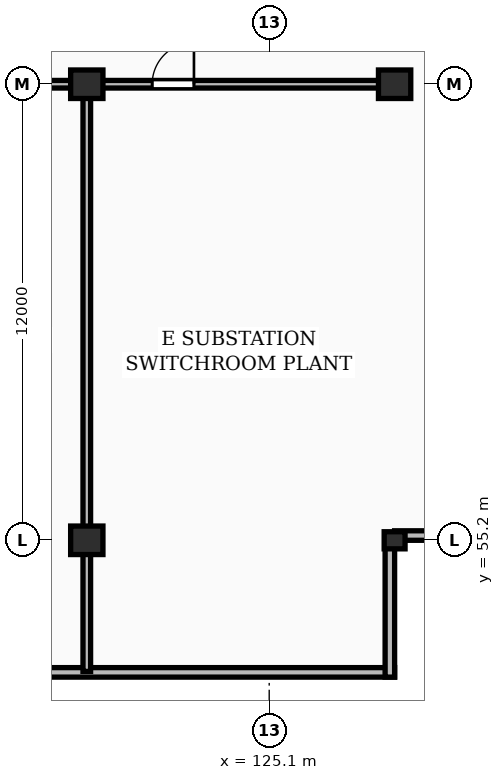
"""IFC4 building model, lengths in metres.
Left out: names, types, materials, properties, quantities, classifications, styles, units other than length and angle.
Written with IfcOpenShell. Run it as: python <this file> out.ifc"""

import sys

from ifc_helpers import new_model, si_unit, direction, frame, frame_2d, origin, origin_2d, place, context, subcontext, project, spatial, rectangle, extrude, element, fill, save


model = new_model("IFC4")
c1 = context("Model", 3, precision=1e-05, world=origin(), true_north=direction((0.0, 1.0)))
c2 = subcontext(c1, "Body", "Model", "MODEL_VIEW")
j1 = project(units=[si_unit("LENGTHUNIT", "METRE"), si_unit("PLANEANGLEUNIT", "RADIAN")], contexts=[c1])
p1 = place(None, origin())
s1 = spatial("IfcSite", under=j1, at=p1, CompositionType="ELEMENT")
p2 = place(p1, origin())
s2 = spatial("IfcBuilding", under=s1, at=p2, CompositionType="ELEMENT")
p3 = place(p2, frame((0.0, 0.0, 223.85)))
s3 = spatial("IfcBuildingStorey", under=s2, at=p3, CompositionType="ELEMENT", Elevation=223.85)
for number, where, z_axis, x_axis in (
    (1, (120.3, 55.2, 0.0), (0.0, 0.0, 1.0), (1.0, 0.0, 0.0)),
    (2, (120.3, 67.2, 0.0), (0.0, 0.0, 1.0), (1.0, 0.0, 0.0)),
):
    element("IfcColumn", number, at=place(p3, frame(where, z_axis=z_axis, x_axis=x_axis)), inside=s3, PredefinedType="COLUMN", context=c2, shape_type="SweptSolid", body=[
        extrude(rectangle(XDim=0.85, YDim=0.75, at=origin_2d()), origin(), (0.0, 0.0, 1.0), 4.8),
    ])
p4 = place(p3, frame((128.4, 55.2, 0.0), z_axis=(0.0, 0.0, 1.0), x_axis=(1.0, 0.0, 0.0)))
e3 = element("IfcColumn", 3, at=p4, inside=s3, PredefinedType="PILASTER", context=c2, shape_type="SweptSolid", body=[
    extrude(rectangle(XDim=0.55, YDim=0.45, at=origin_2d()), origin(), (0.0, 0.0, 1.0), 4.8),
])
p5 = place(p3, frame((128.4, 67.2, 0.0), z_axis=(0.0, 0.0, 1.0), x_axis=(1.0, 0.0, 0.0)))
e4 = element("IfcColumn", 4, at=p5, inside=s3, PredefinedType="COLUMN", context=c2, shape_type="SweptSolid", body=[
    extrude(rectangle(XDim=0.85, YDim=0.75, at=origin_2d()), origin(), (0.0, 0.0, 1.0), 4.8),
])
p6 = place(p3, frame((59.8, 51.725, 0.0), z_axis=(0.0, 0.0, 1.0), x_axis=(1.0, 0.0, 0.0)))
e5 = element("IfcWall", 5, at=p6, inside=s3, PredefinedType="SHEAR", context=c2, shape_type="SweptSolid", body=[
    extrude(rectangle(XDim=68.6, YDim=0.25, at=frame_2d((34.3, 0.0))), origin(), (0.0, 0.0, 1.0), 4.48),
])
p7 = place(p3, frame((128.275, 51.6, 0.0), z_axis=(0.0, 0.0, 1.0), x_axis=(0.0, 1.0, 0.0)))
e6 = element("IfcWall", 6, at=p7, inside=s3, PredefinedType="SHEAR", context=c2, shape_type="SweptSolid", body=[
    extrude(rectangle(XDim=3.6, YDim=0.25, at=frame_2d((1.8, 0.0))), origin(), (0.0, 0.0, 1.0), 4.48),
])
p8 = place(p3, frame((128.4, 55.325, 0.0), z_axis=(0.0, 0.0, 1.0), x_axis=(1.0, 0.0, 0.0)))
e7 = element("IfcWall", 7, at=p8, inside=s3, PredefinedType="SHEAR", context=c2, shape_type="SweptSolid", body=[
    extrude(rectangle(XDim=3.6, YDim=0.25, at=frame_2d((1.8, 0.0))), origin(), (0.0, 0.0, 1.0), 4.48),
])
p9 = place(p3, frame((120.3, 51.75, 0.0), z_axis=(0.0, 0.0, 1.0), x_axis=(0.0, 1.0, 0.0)))
e8 = element("IfcWall", 8, at=p9, inside=s3, PredefinedType="PARTITIONING", context=c2, shape_type="SweptSolid", body=[
    extrude(rectangle(XDim=15.4, YDim=0.2, at=frame_2d((7.7, 0.0))), origin(), (0.0, 0.0, 1.0), 3.23),
])
p10 = place(p3, frame((112.25, 67.2, 0.0), z_axis=(0.0, 0.0, 1.0), x_axis=(1.0, 0.0, 0.0)))
e9 = element("IfcWall", 9, at=p10, inside=s3, PredefinedType="PARTITIONING", context=c2, shape_type="SweptSolid", body=[
    extrude(rectangle(XDim=16.1, YDim=0.2, at=frame_2d((8.05, 0.0))), origin(), (0.0, 0.0, 1.0), 3.23),
])
p11 = place(p10, frame((5.241, 0.0, 0.0)))
e10 = element("IfcOpeningElement", 10, at=p11, cuts=e9, PredefinedType="OPENING", context=c2, shape_type="SweptSolid", body=[
    extrude(rectangle(XDim=1.1, YDim=2.1, at=frame_2d((0.55, 1.05))), frame((0.0, 0.11, 0.0), z_axis=(0.0, -1.0, 0.0), x_axis=(1.0, 0.0, 0.0)), (0.0, 0.0, 1.0), 0.22),
])
p12 = place(p10, frame((9.77, 0.0, 0.0)))
e11 = element("IfcOpeningElement", 11, at=p12, cuts=e9, PredefinedType="OPENING", context=c2, shape_type="SweptSolid", body=[
    extrude(rectangle(XDim=1.1, YDim=2.1, at=frame_2d((0.55, 1.05))), frame((0.0, 0.11, 0.0), z_axis=(0.0, -1.0, 0.0), x_axis=(1.0, 0.0, 0.0)), (0.0, 0.0, 1.0), 0.22),
])
p13 = place(p12, origin())
e12 = element("IfcDoor", 12, at=p13, inside=s3, OperationType="SINGLE_SWING_RIGHT", PredefinedType="DOOR", context=c2, shape_type="SweptSolid", body=[
    extrude(rectangle(XDim=1.1, YDim=2.1, at=frame_2d((0.55, 1.05))), frame((0.0, 0.025, 0.0), z_axis=(0.0, -1.0, 0.0), x_axis=(1.0, 0.0, 0.0)), (0.0, 0.0, 1.0), 0.05),
])
fill(e11, e12)
save(model, sys.argv[1])
